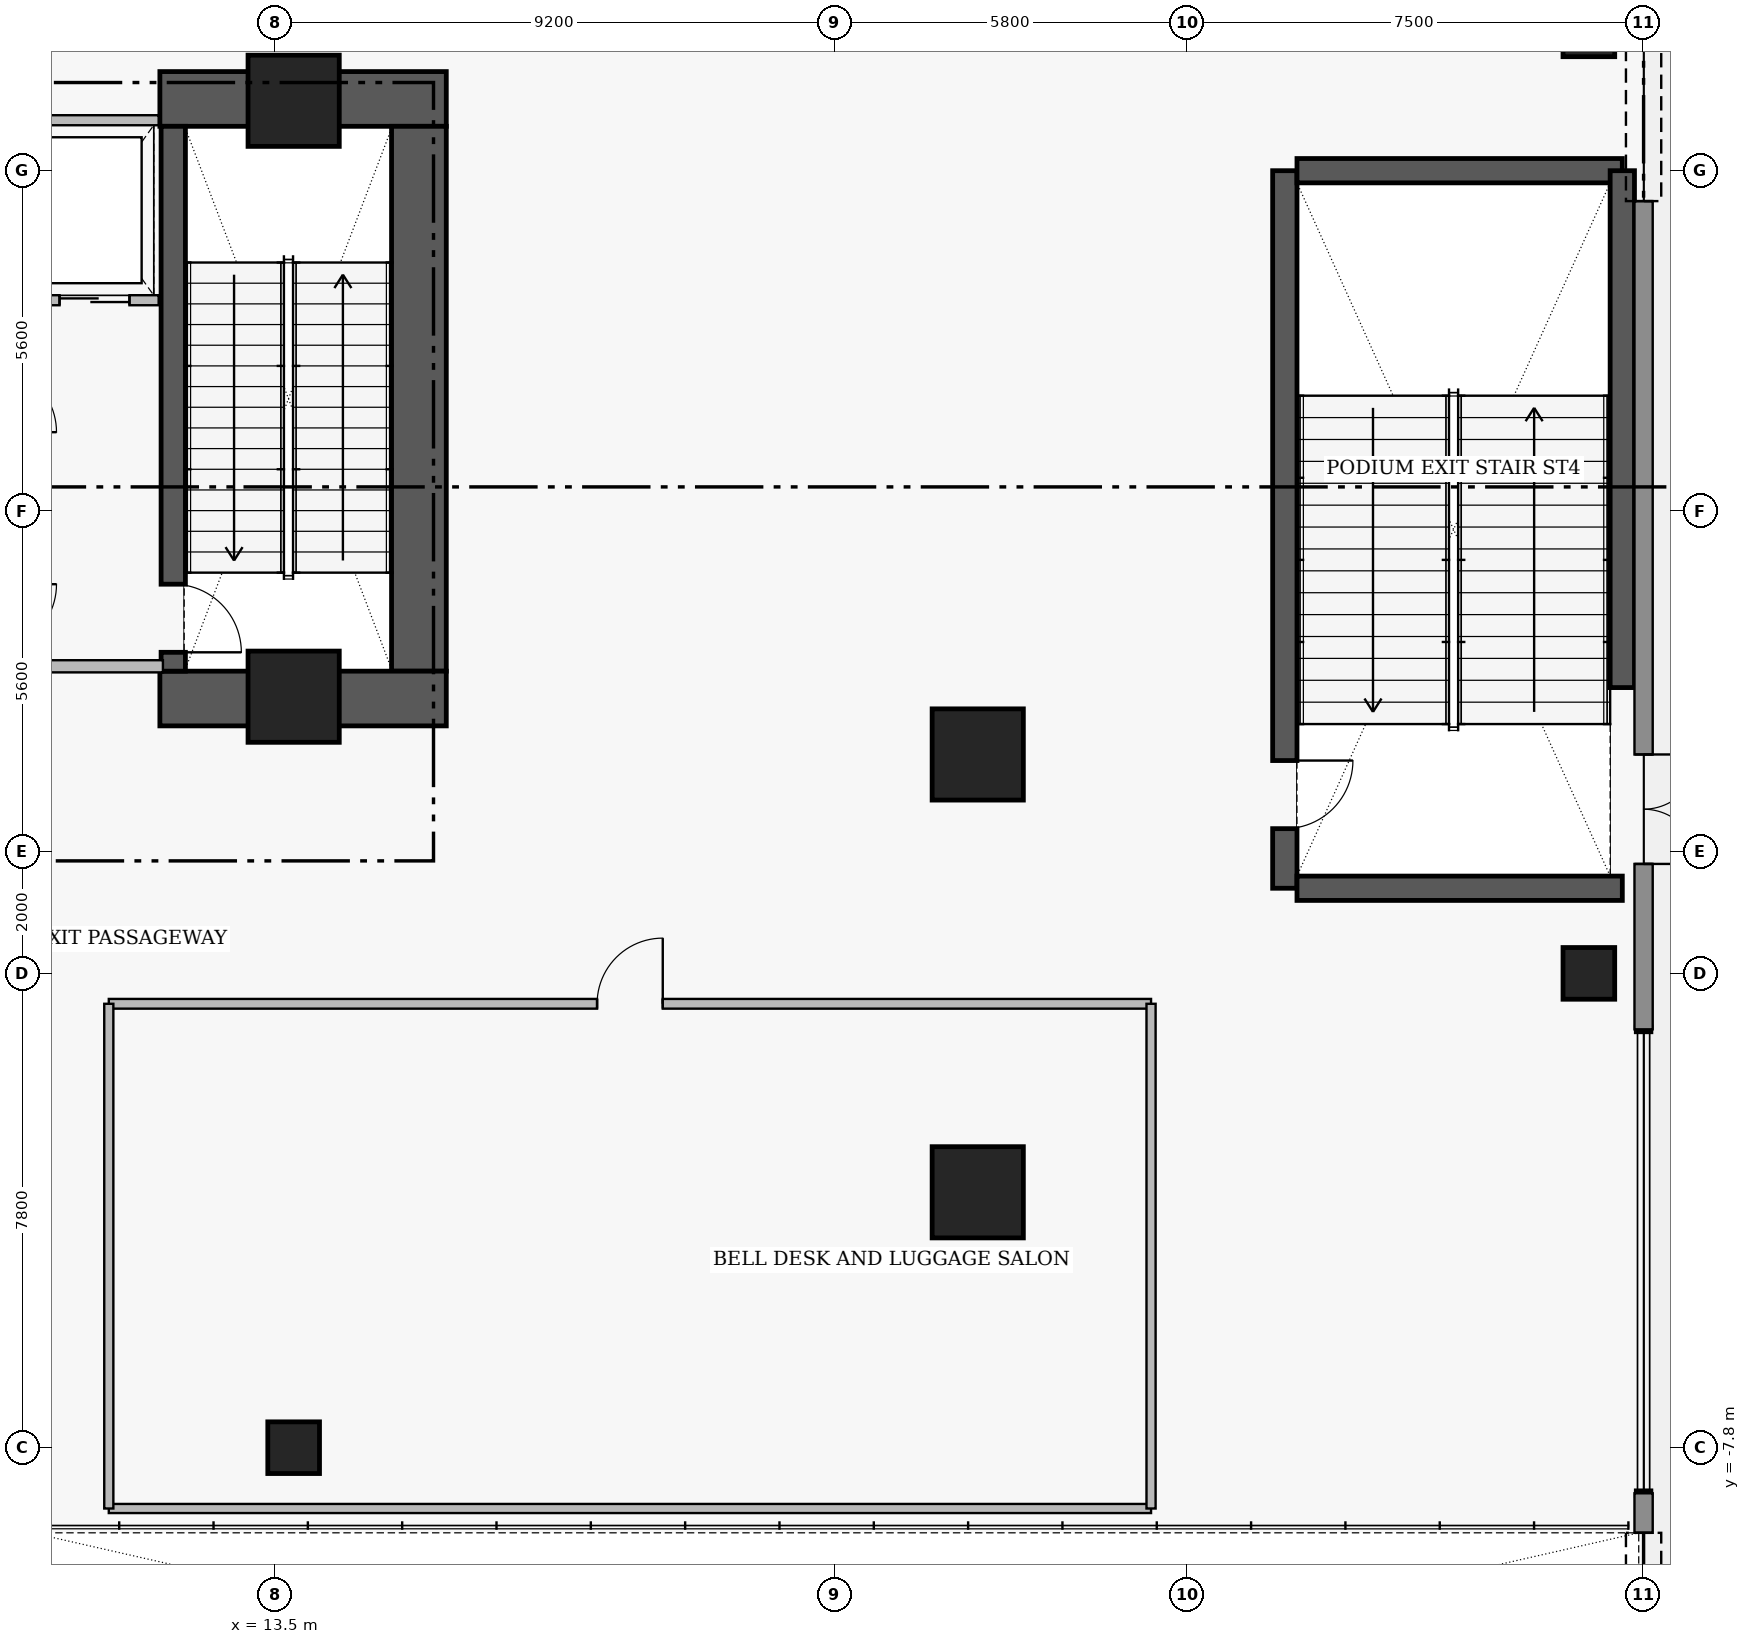
"""IFC4 building model, lengths in metres.
Left out: names, types, materials, properties, quantities, classifications, styles, units other than length and angle.
Written with IfcOpenShell. Run it as: python <this file> out.ifc"""

import sys

from ifc_helpers import new_model, si_unit, direction, frame, frame_2d, origin, origin_2d, place, context, subcontext, project, spatial, rectangle, extrude, element, fill, save


model = new_model("IFC4")
c1 = context("Model", 3, precision=1e-05, world=origin(), true_north=direction((0.0, 1.0)))
c2 = subcontext(c1, "Body", "Model", "MODEL_VIEW")
j1 = project(units=[si_unit("LENGTHUNIT", "METRE"), si_unit("PLANEANGLEUNIT", "RADIAN")], contexts=[c1])
p1 = place(None, origin())
s1 = spatial("IfcSite", under=j1, at=p1, CompositionType="ELEMENT")
p2 = place(p1, origin())
s2 = spatial("IfcBuilding", under=s1, at=p2, CompositionType="ELEMENT")
p3 = place(p2, origin())
s3 = spatial("IfcBuildingStorey", under=s2, at=p3, CompositionType="ELEMENT", Elevation=0.0)
p4 = place(p3, frame((11.6, 14.38, 0.0), z_axis=(0.0, 0.0, 1.0), x_axis=(1.0, 0.0, 0.0)))
e1 = element("IfcWall", 1, at=p4, inside=s3, PredefinedType="SHEAR", context=c2, shape_type="SweptSolid", body=[
    extrude(rectangle(XDim=4.71, YDim=0.9, at=frame_2d((2.355, 0.0))), origin(), (0.0, 0.0, 1.0), 5.81),
])
p5 = place(p3, frame((15.86, 4.97, 0.0), z_axis=(0.0, 0.0, 1.0), x_axis=(0.0, 1.0, 0.0)))
e2 = element("IfcWall", 2, at=p5, inside=s3, PredefinedType="SHEAR", context=c2, shape_type="SweptSolid", body=[
    extrude(rectangle(XDim=8.96, YDim=0.9, at=frame_2d((4.48, 0.0))), origin(), (0.0, 0.0, 1.0), 5.81),
])
p6 = place(p3, frame((11.6, 4.52, 0.0), z_axis=(0.0, 0.0, 1.0), x_axis=(1.0, 0.0, 0.0)))
e3 = element("IfcWall", 3, at=p6, inside=s3, PredefinedType="SHEAR", context=c2, shape_type="SweptSolid", body=[
    extrude(rectangle(XDim=4.71, YDim=0.9, at=frame_2d((2.355, 0.0))), origin(), (0.0, 0.0, 1.0), 5.81),
])
p7 = place(p3, frame((11.82, 13.93, 0.0), z_axis=(0.0, 0.0, 1.0), x_axis=(0.0, -1.0, 0.0)))
e4 = element("IfcWall", 4, at=p7, inside=s3, PredefinedType="SHEAR", context=c2, shape_type="SweptSolid", body=[
    extrude(rectangle(XDim=8.96, YDim=0.4, at=frame_2d((4.48, 0.0))), origin(), (0.0, 0.0, 1.0), 5.81),
])
p8 = place(p7, frame((7.53, 0.0, 0.0)))
e5 = element("IfcOpeningElement", 5, at=p8, cuts=e4, PredefinedType="OPENING", context=c2, shape_type="SweptSolid", body=[
    extrude(rectangle(XDim=1.12, YDim=2.22, at=frame_2d((0.56, 1.11))), frame((0.0, 0.21, 0.0), z_axis=(0.0, -1.0, 0.0), x_axis=(1.0, 0.0, 0.0)), (0.0, 0.0, 1.0), 0.42),
])
p9 = place(p3, frame((30.1, 13.2, 0.0), z_axis=(0.0, 0.0, 1.0), x_axis=(0.0, -1.0, 0.0)))
e6 = element("IfcWall", 6, at=p9, inside=s3, PredefinedType="SHEAR", context=c2, shape_type="SweptSolid", body=[
    extrude(rectangle(XDim=11.8, YDim=0.4, at=frame_2d((5.9, 0.0))), origin(), (0.0, 0.0, 1.0), 5.81),
])
p10 = place(p9, frame((9.7, 0.0, 0.0)))
e7 = element("IfcOpeningElement", 7, at=p10, cuts=e6, PredefinedType="OPENING", context=c2, shape_type="SweptSolid", body=[
    extrude(rectangle(XDim=1.12, YDim=2.22, at=frame_2d((0.56, 1.11))), frame((0.0, 0.21, 0.0), z_axis=(0.0, -1.0, 0.0), x_axis=(1.0, 0.0, 0.0)), (0.0, 0.0, 1.0), 0.42),
])
for number, where, z_axis, x_axis in (
    (8, (30.3, 1.4, 0.0), (0.0, 0.0, 1.0), (1.0, 0.0, 0.0)),
    (9, (30.3, 13.2, 0.0), (0.0, 0.0, 1.0), (1.0, 0.0, 0.0)),
):
    element("IfcWall", number, at=place(p3, frame(where, z_axis=z_axis, x_axis=x_axis)), inside=s3, PredefinedType="SHEAR", context=c2, shape_type="SweptSolid", body=[
        extrude(rectangle(XDim=5.35, YDim=0.4, at=frame_2d((2.675, 0.0))), origin(), (0.0, 0.0, 1.0), 5.81),
    ])
p11 = place(p3, frame((35.65, 4.7, 0.0), z_axis=(0.0, 0.0, 1.0), x_axis=(0.0, 1.0, 0.0)))
e10 = element("IfcWall", 10, at=p11, inside=s3, PredefinedType="SHEAR", context=c2, shape_type="SweptSolid", body=[
    extrude(rectangle(XDim=8.5, YDim=0.4, at=frame_2d((4.25, 0.0))), origin(), (0.0, 0.0, 1.0), 5.81),
])
for number, where, z_axis, x_axis in (
    (11, (13.8, 14.35, 0.0), (0.0, 0.0, 1.0), (1.0, 0.0, 0.0)),
    (12, (13.8, 4.55, 0.0), (0.0, 0.0, 1.0), (1.0, 0.0, 0.0)),
    (13, (25.05, -3.6, 0.0), (0.0, 0.0, 1.0), (1.0, 0.0, 0.0)),
    (14, (25.05, 3.6, 0.0), (0.0, 0.0, 1.0), (1.0, 0.0, 0.0)),
):
    element("IfcColumn", number, at=place(p3, frame(where, z_axis=z_axis, x_axis=x_axis)), inside=s3, PredefinedType="COLUMN", context=c2, shape_type="SweptSolid", body=[
        extrude(rectangle(XDim=1.5, YDim=1.5, at=origin_2d()), origin(), (0.0, 0.0, 1.0), 6.0),
    ])
for number, where, z_axis, x_axis in (
    (15, (35.1, 0.0, 0.0), (0.0, 0.0, 1.0), (1.0, 0.0, 0.0)),
    (16, (35.1, 15.5, 0.0), (0.0, 0.0, 1.0), (1.0, 0.0, 0.0)),
    (17, (13.8, -7.8, 0.0), (0.0, 0.0, 1.0), (1.0, 0.0, 0.0)),
):
    element("IfcColumn", number, at=place(p3, frame(where, z_axis=z_axis, x_axis=x_axis)), inside=s3, PredefinedType="COLUMN", context=c2, shape_type="SweptSolid", body=[
        extrude(rectangle(XDim=0.85, YDim=0.85, at=origin_2d()), origin(), (0.0, 0.0, 1.0), 6.0),
    ])
p12 = place(p3, frame((36.0, 16.95, 0.0), z_axis=(0.0, 0.0, 1.0), x_axis=(0.0, -1.0, 0.0)))
e18 = element("IfcWall", 18, at=p12, inside=s3, PredefinedType="STANDARD", context=c2, shape_type="SweptSolid", body=[
    extrude(rectangle(XDim=17.87, YDim=0.3, at=frame_2d((8.935, 0.0))), origin(), (0.0, 0.0, 1.0), 5.75),
])
p13 = place(p12, frame((13.35, 0.0, 0.0)))
e19 = element("IfcOpeningElement", 19, at=p13, cuts=e18, PredefinedType="OPENING", context=c2, shape_type="SweptSolid", body=[
    extrude(rectangle(XDim=1.8, YDim=2.4, at=frame_2d((0.9, 1.2))), frame((0.0, 0.16, 0.0), z_axis=(0.0, -1.0, 0.0), x_axis=(1.0, 0.0, 0.0)), (0.0, 0.0, 1.0), 0.32),
])
p14 = place(p12, frame((0.65, 0.0, 0.0)))
e20 = element("IfcOpeningElement", 20, at=p14, cuts=e18, PredefinedType="OPENING", context=c2, shape_type="SweptSolid", body=[
    extrude(rectangle(XDim=3.6, YDim=3.4, at=frame_2d((1.8, 1.7))), frame((0.0, 0.16, 0.0), z_axis=(0.0, -1.0, 0.0), x_axis=(1.0, 0.0, 0.0)), (0.0, 0.0, 1.0), 0.32),
])
p15 = place(p3, frame((36.0, -8.55, 0.0), z_axis=(0.0, 0.0, 1.0), x_axis=(0.0, -1.0, 0.0)))
e21 = element("IfcWall", 21, at=p15, inside=s3, PredefinedType="STANDARD", context=c2, shape_type="SweptSolid", body=[
    extrude(rectangle(XDim=11.45, YDim=0.3, at=frame_2d((5.725, 0.0))), origin(), (0.0, 0.0, 1.0), 5.75),
])
p16 = place(p15, frame((0.65, 0.0, 0.0)))
e22 = element("IfcOpeningElement", 22, at=p16, cuts=e21, PredefinedType="OPENING", context=c2, shape_type="SweptSolid", body=[
    extrude(rectangle(XDim=6.0, YDim=4.5, at=frame_2d((3.0, 2.25))), frame((0.0, 0.16, 0.0), z_axis=(0.0, -1.0, 0.0), x_axis=(1.0, 0.0, 0.0)), (0.0, 0.0, 1.0), 0.32),
])
p17 = place(p3, frame((9.42, 11.07, 0.0), z_axis=(0.0, 0.0, 1.0), x_axis=(1.0, 0.0, 0.0)))
e23 = element("IfcWall", 23, at=p17, inside=s3, PredefinedType="PARTITIONING", context=c2, shape_type="SweptSolid", body=[
    extrude(rectangle(XDim=2.16, YDim=0.165, at=frame_2d((1.08, 0.0))), origin(), (0.0, 0.0, 1.0), 5.75),
])
p18 = place(p17, frame((0.53, 0.0, 0.0)))
e24 = element("IfcOpeningElement", 24, at=p18, cuts=e23, PredefinedType="OPENING", context=c2, shape_type="SweptSolid", body=[
    extrude(rectangle(XDim=1.15, YDim=2.25, at=frame_2d((0.575, 1.125))), frame((0.0, 0.093, 0.0), z_axis=(0.0, -1.0, 0.0), x_axis=(1.0, 0.0, 0.0)), (0.0, 0.0, 1.0), 0.185),
])
p19 = place(p3, frame((10.76, -0.5, 0.0), z_axis=(0.0, 0.0, 1.0), x_axis=(1.0, 0.0, 0.0)))
e25 = element("IfcWall", 25, at=p19, inside=s3, PredefinedType="PARTITIONING", context=c2, shape_type="SweptSolid", body=[
    extrude(rectangle(XDim=17.14, YDim=0.16, at=frame_2d((8.57, 0.0))), origin(), (0.0, 0.0, 1.0), 5.75),
])
p20 = place(p19, frame((8.03, 0.0, 0.0)))
e26 = element("IfcOpeningElement", 26, at=p20, cuts=e25, PredefinedType="OPENING", context=c2, shape_type="SweptSolid", body=[
    extrude(rectangle(XDim=1.08, YDim=2.18, at=frame_2d((0.54, 1.09))), frame((0.0, 0.09, 0.0), z_axis=(0.0, -1.0, 0.0), x_axis=(1.0, 0.0, 0.0)), (0.0, 0.0, 1.0), 0.18),
])
p21 = place(p3, frame((8.8, 5.05, 0.0), z_axis=(0.0, 0.0, 1.0), x_axis=(1.0, 0.0, 0.0)))
e27 = element("IfcWall", 27, at=p21, inside=s3, PredefinedType="PARTITIONING", context=c2, shape_type="SweptSolid", body=[
    extrude(rectangle(XDim=2.85, YDim=0.2, at=frame_2d((1.425, 0.0))), origin(), (0.0, 0.0, 1.0), 5.75),
])
p22 = place(p3, frame((9.42, 14.03, 0.0), z_axis=(0.0, 0.0, 1.0), x_axis=(1.0, 0.0, 0.0)))
e28 = element("IfcWall", 28, at=p22, inside=s3, PredefinedType="PARTITIONING", context=c2, shape_type="SweptSolid", body=[
    extrude(rectangle(XDim=2.16, YDim=0.165, at=frame_2d((1.08, 0.0))), origin(), (0.0, 0.0, 1.0), 5.75),
])
p23 = place(p3, frame((10.76, -8.8, 0.0), z_axis=(0.0, 0.0, 1.0), x_axis=(1.0, 0.0, 0.0)))
e29 = element("IfcWall", 29, at=p23, inside=s3, PredefinedType="PARTITIONING", context=c2, shape_type="SweptSolid", body=[
    extrude(rectangle(XDim=17.14, YDim=0.15, at=frame_2d((8.57, 0.0))), origin(), (0.0, 0.0, 1.0), 5.75),
])
for number, where, z_axis, x_axis in (
    (30, (10.76, -8.8, 0.0), (0.0, 0.0, 1.0), (0.0, 1.0, 0.0)),
    (31, (27.9, -8.8, 0.0), (0.0, 0.0, 1.0), (0.0, 1.0, 0.0)),
):
    element("IfcWall", number, at=place(p3, frame(where, z_axis=z_axis, x_axis=x_axis)), inside=s3, PredefinedType="PARTITIONING", context=c2, shape_type="SweptSolid", body=[
        extrude(rectangle(XDim=8.3, YDim=0.15, at=frame_2d((4.15, 0.0))), origin(), (0.0, 0.0, 1.0), 5.75),
    ])
p24 = place(p13, origin())
e32 = element("IfcDoor", 32, at=p24, inside=s3, OperationType="DOUBLE_DOOR_SINGLE_SWING", PredefinedType="DOOR", context=c2, shape_type="SweptSolid", body=[
    extrude(rectangle(XDim=1.8, YDim=2.4, at=frame_2d((0.9, 1.2))), frame((0.0, 0.025, 0.0), z_axis=(0.0, -1.0, 0.0), x_axis=(1.0, 0.0, 0.0)), (0.0, 0.0, 1.0), 0.05),
])
fill(e19, e32)
p25 = place(p14, origin())
e33 = element("IfcDoor", 33, at=p25, inside=s3, OperationType="ROLLINGUP", PredefinedType="GATE", context=c2, shape_type="SweptSolid", body=[
    extrude(rectangle(XDim=3.6, YDim=3.4, at=frame_2d((1.8, 1.7))), frame((0.0, 0.025, 0.0), z_axis=(0.0, -1.0, 0.0), x_axis=(1.0, 0.0, 0.0)), (0.0, 0.0, 1.0), 0.05),
])
fill(e20, e33)
p26 = place(p16, origin())
e34 = element("IfcDoor", 34, at=p26, inside=s3, OperationType="ROLLINGUP", PredefinedType="GATE", context=c2, shape_type="SweptSolid", body=[
    extrude(rectangle(XDim=6.0, YDim=4.5, at=frame_2d((3.0, 2.25))), frame((0.0, 0.025, 0.0), z_axis=(0.0, -1.0, 0.0), x_axis=(1.0, 0.0, 0.0)), (0.0, 0.0, 1.0), 0.05),
])
fill(e22, e34)
p27 = place(p8, origin())
e35 = element("IfcDoor", 35, at=p27, inside=s3, OperationType="SINGLE_SWING_RIGHT", PredefinedType="DOOR", context=c2, shape_type="SweptSolid", body=[
    extrude(rectangle(XDim=1.12, YDim=2.22, at=frame_2d((0.56, 1.11))), frame((0.0, 0.025, 0.0), z_axis=(0.0, -1.0, 0.0), x_axis=(1.0, 0.0, 0.0)), (0.0, 0.0, 1.0), 0.05),
])
fill(e5, e35)
p28 = place(p10, origin())
e36 = element("IfcDoor", 36, at=p28, inside=s3, OperationType="SINGLE_SWING_LEFT", PredefinedType="DOOR", context=c2, shape_type="SweptSolid", body=[
    extrude(rectangle(XDim=1.12, YDim=2.22, at=frame_2d((0.56, 1.11))), frame((0.0, 0.025, 0.0), z_axis=(0.0, -1.0, 0.0), x_axis=(1.0, 0.0, 0.0)), (0.0, 0.0, 1.0), 0.05),
])
fill(e7, e36)
p29 = place(p18, origin())
e37 = element("IfcDoor", 37, at=p29, inside=s3, OperationType="SLIDING_TO_LEFT", PredefinedType="DOOR", context=c2, shape_type="SweptSolid", body=[
    extrude(rectangle(XDim=1.15, YDim=2.25, at=frame_2d((0.575, 1.125))), frame((0.0, 0.025, 0.0), z_axis=(0.0, -1.0, 0.0), x_axis=(1.0, 0.0, 0.0)), (0.0, 0.0, 1.0), 0.05),
])
fill(e24, e37)
p30 = place(p20, origin())
e38 = element("IfcDoor", 38, at=p30, inside=s3, OperationType="SINGLE_SWING_RIGHT", PredefinedType="DOOR", context=c2, shape_type="SweptSolid", body=[
    extrude(rectangle(XDim=1.08, YDim=2.18, at=frame_2d((0.54, 1.09))), frame((0.0, 0.025, 0.0), z_axis=(0.0, -1.0, 0.0), x_axis=(1.0, 0.0, 0.0)), (0.0, 0.0, 1.0), 0.05),
])
fill(e26, e38)
save(model, sys.argv[1])
